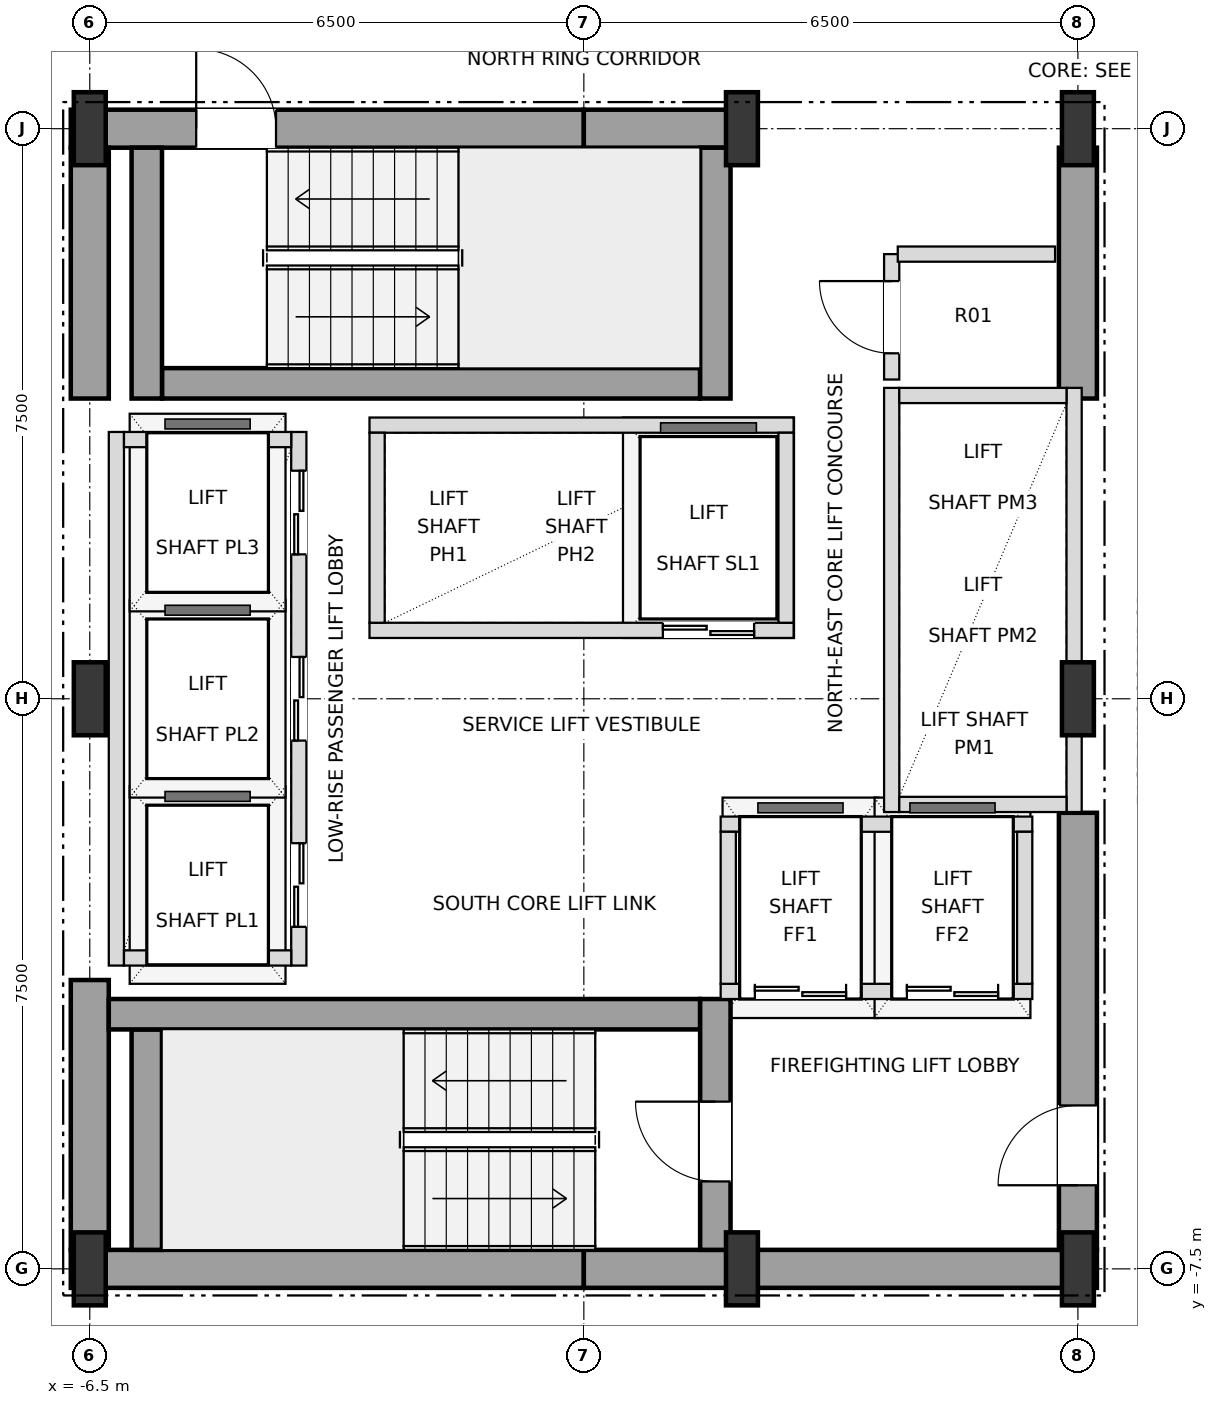
"""IFC4 building model, lengths in metres.
Left out: names, types, materials, properties, quantities, classifications, styles, units other than length and angle.
Written with IfcOpenShell. Run it as: python <this file> out.ifc"""

import sys

from ifc_helpers import new_model, si_unit, direction, frame, frame_2d, origin, origin_2d, place, context, subcontext, project, spatial, rectangle, i_section, extrude, element, fill, save


model = new_model("IFC4")
c1 = context("Model", 3, precision=1e-05, world=origin(), true_north=direction((0.0, 1.0)))
c2 = subcontext(c1, "Body", "Model", "MODEL_VIEW")
j1 = project(units=[si_unit("LENGTHUNIT", "METRE"), si_unit("PLANEANGLEUNIT", "RADIAN")], contexts=[c1])
p1 = place(None, origin())
s1 = spatial("IfcSite", under=j1, at=p1, CompositionType="ELEMENT")
p2 = place(p1, origin())
s2 = spatial("IfcBuilding", under=s1, at=p2, CompositionType="ELEMENT")
p3 = place(p2, frame((0.0, 0.0, 68.4)))
s3 = spatial("IfcBuildingStorey", under=s2, at=p3, CompositionType="ELEMENT", Elevation=68.4)
for number, where, z_axis, x_axis in (
    (1, (-6.5, -7.5, 0.0), (0.0, 0.0, 1.0), (1.0, 0.0, 0.0)),
    (2, (2.08, -7.5, 0.0), (0.0, 0.0, 1.0), (1.0, 0.0, 0.0)),
    (3, (6.5, -7.5, 0.0), (0.0, 0.0, 1.0), (1.0, 0.0, 0.0)),
    (4, (-6.5, 0.0, 0.0), (0.0, 0.0, 1.0), (1.0, 0.0, 0.0)),
    (5, (6.5, 0.0, 0.0), (0.0, 0.0, 1.0), (1.0, 0.0, 0.0)),
    (6, (-6.5, 7.5, 0.0), (0.0, 0.0, 1.0), (1.0, 0.0, 0.0)),
    (7, (2.08, 7.5, 0.0), (0.0, 0.0, 1.0), (1.0, 0.0, 0.0)),
    (8, (6.5, 7.5, 0.0), (0.0, 0.0, 1.0), (1.0, 0.0, 0.0)),
):
    element("IfcColumn", number, at=place(p3, frame(where, z_axis=z_axis, x_axis=x_axis)), inside=s3, PredefinedType="COLUMN", context=c2, shape_type="SweptSolid", body=[
        extrude(i_section(OverallWidth=0.42, OverallDepth=0.96, WebThickness=0.022, FlangeThickness=0.034, at=origin_2d()), origin(), (0.0, 0.0, 1.0), 3.6),
    ])
for number, where, z_axis, x_axis in (
    (9, (-6.75, -7.5, 0.0), (0.0, 0.0, 1.0), (1.0, 0.0, 0.0)),
    (10, (0.0, -7.5, 0.0), (0.0, 0.0, 1.0), (1.0, 0.0, 0.0)),
):
    element("IfcWall", number, at=place(p3, frame(where, z_axis=z_axis, x_axis=x_axis)), inside=s3, PredefinedType="SHEAR", context=c2, shape_type="SweptSolid", body=[
        extrude(rectangle(XDim=6.75, YDim=0.5, at=frame_2d((3.375, 0.0))), origin(), (0.0, 0.0, 1.0), 3.38),
    ])
p4 = place(p3, frame((-6.75, 7.5, 0.0), z_axis=(0.0, 0.0, 1.0), x_axis=(1.0, 0.0, 0.0)))
e11 = element("IfcWall", 11, at=p4, inside=s3, PredefinedType="SHEAR", context=c2, shape_type="SweptSolid", body=[
    extrude(rectangle(XDim=6.75, YDim=0.5, at=frame_2d((3.375, 0.0))), origin(), (0.0, 0.0, 1.0), 3.38),
])
p5 = place(p4, frame((1.65, 0.0, 0.0)))
e12 = element("IfcOpeningElement", 12, at=p5, cuts=e11, PredefinedType="OPENING", context=c2, shape_type="SweptSolid", body=[
    extrude(rectangle(XDim=1.05, YDim=2.15, at=frame_2d((0.525, 1.075))), frame((0.0, 0.26, 0.0), z_axis=(0.0, -1.0, 0.0), x_axis=(1.0, 0.0, 0.0)), (0.0, 0.0, 1.0), 0.52),
])
p6 = place(p3, frame((0.0, 7.5, 0.0), z_axis=(0.0, 0.0, 1.0), x_axis=(1.0, 0.0, 0.0)))
e13 = element("IfcWall", 13, at=p6, inside=s3, PredefinedType="SHEAR", context=c2, shape_type="SweptSolid", body=[
    extrude(rectangle(XDim=2.08, YDim=0.5, at=frame_2d((1.04, 0.0))), origin(), (0.0, 0.0, 1.0), 3.38),
])
p7 = place(p3, frame((-6.5, -7.25, 0.0), z_axis=(0.0, 0.0, 1.0), x_axis=(0.0, 1.0, 0.0)))
e14 = element("IfcWall", 14, at=p7, inside=s3, PredefinedType="SHEAR", context=c2, shape_type="SweptSolid", body=[
    extrude(rectangle(XDim=3.55, YDim=0.5, at=frame_2d((1.775, 0.0))), origin(), (0.0, 0.0, 1.0), 3.38),
])
p8 = place(p3, frame((-6.5, 3.95, 0.0), z_axis=(0.0, 0.0, 1.0), x_axis=(0.0, 1.0, 0.0)))
e15 = element("IfcWall", 15, at=p8, inside=s3, PredefinedType="SHEAR", context=c2, shape_type="SweptSolid", body=[
    extrude(rectangle(XDim=3.3, YDim=0.5, at=frame_2d((1.65, 0.0))), origin(), (0.0, 0.0, 1.0), 3.38),
])
p9 = place(p3, frame((6.5, -7.25, 0.0), z_axis=(0.0, 0.0, 1.0), x_axis=(0.0, 1.0, 0.0)))
e16 = element("IfcWall", 16, at=p9, inside=s3, PredefinedType="SHEAR", context=c2, shape_type="SweptSolid", body=[
    extrude(rectangle(XDim=5.75, YDim=0.5, at=frame_2d((2.875, 0.0))), origin(), (0.0, 0.0, 1.0), 3.38),
])
p10 = place(p9, frame((0.85, 0.0, 0.0)))
e17 = element("IfcOpeningElement", 17, at=p10, cuts=e16, PredefinedType="OPENING", context=c2, shape_type="SweptSolid", body=[
    extrude(rectangle(XDim=1.05, YDim=2.15, at=frame_2d((0.525, 1.075))), frame((0.0, 0.26, 0.0), z_axis=(0.0, -1.0, 0.0), x_axis=(1.0, 0.0, 0.0)), (0.0, 0.0, 1.0), 0.52),
])
p11 = place(p3, frame((6.5, 3.95, 0.0), z_axis=(0.0, 0.0, 1.0), x_axis=(0.0, 1.0, 0.0)))
e18 = element("IfcWall", 18, at=p11, inside=s3, PredefinedType="SHEAR", context=c2, shape_type="SweptSolid", body=[
    extrude(rectangle(XDim=3.3, YDim=0.5, at=frame_2d((1.65, 0.0))), origin(), (0.0, 0.0, 1.0), 3.38),
])
p12 = place(p3, frame((-5.75, -7.25, 0.0), z_axis=(0.0, 0.0, 1.0), x_axis=(0.0, 1.0, 0.0)))
e19 = element("IfcWall", 19, at=p12, inside=s3, PredefinedType="SHEAR", context=c2, shape_type="SweptSolid", body=[
    extrude(rectangle(XDim=2.9, YDim=0.4, at=frame_2d((1.45, 0.0))), origin(), (0.0, 0.0, 1.0), 3.38),
])
p13 = place(p3, frame((-6.25, -4.15, 0.0), z_axis=(0.0, 0.0, 1.0), x_axis=(1.0, 0.0, 0.0)))
e20 = element("IfcWall", 20, at=p13, inside=s3, PredefinedType="SHEAR", context=c2, shape_type="SweptSolid", body=[
    extrude(rectangle(XDim=7.78, YDim=0.4, at=frame_2d((3.89, 0.0))), origin(), (0.0, 0.0, 1.0), 3.38),
])
p14 = place(p3, frame((1.73, -7.25, 0.0), z_axis=(0.0, 0.0, 1.0), x_axis=(0.0, 1.0, 0.0)))
e21 = element("IfcWall", 21, at=p14, inside=s3, PredefinedType="SHEAR", context=c2, shape_type="SweptSolid", body=[
    extrude(rectangle(XDim=3.3, YDim=0.4, at=frame_2d((1.65, 0.0))), origin(), (0.0, 0.0, 1.0), 3.38),
])
p15 = place(p14, frame((0.9, 0.0, 0.0)))
e22 = element("IfcOpeningElement", 22, at=p15, cuts=e21, PredefinedType="OPENING", context=c2, shape_type="SweptSolid", body=[
    extrude(rectangle(XDim=1.05, YDim=2.15, at=frame_2d((0.525, 1.075))), frame((0.0, 0.21, 0.0), z_axis=(0.0, -1.0, 0.0), x_axis=(1.0, 0.0, 0.0)), (0.0, 0.0, 1.0), 0.42),
])
p16 = place(p3, frame((-5.55, 4.15, 0.0), z_axis=(0.0, 0.0, 1.0), x_axis=(1.0, 0.0, 0.0)))
e23 = element("IfcWall", 23, at=p16, inside=s3, PredefinedType="SHEAR", context=c2, shape_type="SweptSolid", body=[
    extrude(rectangle(XDim=7.08, YDim=0.4, at=frame_2d((3.54, 0.0))), origin(), (0.0, 0.0, 1.0), 3.38),
])
for number, where, z_axis, x_axis in (
    (24, (1.73, 3.95, 0.0), (0.0, 0.0, 1.0), (0.0, 1.0, 0.0)),
    (25, (-5.75, 3.95, 0.0), (0.0, 0.0, 1.0), (0.0, 1.0, 0.0)),
):
    element("IfcWall", number, at=place(p3, frame(where, z_axis=z_axis, x_axis=x_axis)), inside=s3, PredefinedType="SHEAR", context=c2, shape_type="SweptSolid", body=[
        extrude(rectangle(XDim=3.3, YDim=0.4, at=frame_2d((1.65, 0.0))), origin(), (0.0, 0.0, 1.0), 3.38),
    ])
p17 = place(p3, frame((-3.75, -3.51, 0.0), z_axis=(0.0, 0.0, 1.0), x_axis=(0.0, 1.0, 0.0)))
e26 = element("IfcWall", 26, at=p17, inside=s3, PredefinedType="SOLIDWALL", context=c2, shape_type="SweptSolid", body=[
    extrude(rectangle(XDim=7.02, YDim=0.2, at=frame_2d((3.51, 0.0))), origin(), (0.0, 0.0, 1.0), 3.38),
])
p18 = place(p17, frame((0.51, 0.0, 0.0)))
e27 = element("IfcOpeningElement", 27, at=p18, cuts=e26, PredefinedType="OPENING", context=c2, shape_type="SweptSolid", body=[
    extrude(rectangle(XDim=1.1, YDim=2.15, at=frame_2d((0.55, 1.075))), frame((0.0, 0.11, 0.0), z_axis=(0.0, -1.0, 0.0), x_axis=(1.0, 0.0, 0.0)), (0.0, 0.0, 1.0), 0.22),
])
p19 = place(p17, frame((2.96, 0.0, 0.0)))
e28 = element("IfcOpeningElement", 28, at=p19, cuts=e26, PredefinedType="OPENING", context=c2, shape_type="SweptSolid", body=[
    extrude(rectangle(XDim=1.1, YDim=2.15, at=frame_2d((0.55, 1.075))), frame((0.0, 0.11, 0.0), z_axis=(0.0, -1.0, 0.0), x_axis=(1.0, 0.0, 0.0)), (0.0, 0.0, 1.0), 0.22),
])
p20 = place(p17, frame((5.41, 0.0, 0.0)))
e29 = element("IfcOpeningElement", 29, at=p20, cuts=e26, PredefinedType="OPENING", context=c2, shape_type="SweptSolid", body=[
    extrude(rectangle(XDim=1.1, YDim=2.15, at=frame_2d((0.55, 1.075))), frame((0.0, 0.11, 0.0), z_axis=(0.0, -1.0, 0.0), x_axis=(1.0, 0.0, 0.0)), (0.0, 0.0, 1.0), 0.22),
])
p21 = place(p3, frame((-6.15, -3.51, 0.0), z_axis=(0.0, 0.0, 1.0), x_axis=(0.0, 1.0, 0.0)))
e30 = element("IfcWall", 30, at=p21, inside=s3, PredefinedType="SOLIDWALL", context=c2, shape_type="SweptSolid", body=[
    extrude(rectangle(XDim=7.02, YDim=0.2, at=frame_2d((3.51, 0.0))), origin(), (0.0, 0.0, 1.0), 3.38),
])
for number, where, z_axis, x_axis in (
    (31, (-6.05, -3.41, 0.0), (0.0, 0.0, 1.0), (1.0, 0.0, 0.0)),
    (32, (-6.05, 3.41, 0.0), (0.0, 0.0, 1.0), (1.0, 0.0, 0.0)),
):
    element("IfcWall", number, at=place(p3, frame(where, z_axis=z_axis, x_axis=x_axis)), inside=s3, PredefinedType="SOLIDWALL", context=c2, shape_type="SweptSolid", body=[
        extrude(rectangle(XDim=2.2, YDim=0.2, at=frame_2d((1.1, 0.0))), origin(), (0.0, 0.0, 1.0), 3.38),
    ])
p22 = place(p3, frame((4.05, -1.49, 0.0), z_axis=(0.0, 0.0, 1.0), x_axis=(0.0, 1.0, 0.0)))
e33 = element("IfcWall", 33, at=p22, inside=s3, PredefinedType="SOLIDWALL", context=c2, shape_type="SweptSolid", body=[
    extrude(rectangle(XDim=5.58, YDim=0.2, at=frame_2d((2.79, 0.0))), origin(), (0.0, 0.0, 1.0), 3.38),
])
p23 = place(p3, frame((6.45, -1.49, 0.0), z_axis=(0.0, 0.0, 1.0), x_axis=(0.0, 1.0, 0.0)))
e34 = element("IfcWall", 34, at=p23, inside=s3, PredefinedType="SOLIDWALL", context=c2, shape_type="SweptSolid", body=[
    extrude(rectangle(XDim=5.58, YDim=0.2, at=frame_2d((2.79, 0.0))), origin(), (0.0, 0.0, 1.0), 2.816),
])
for number, where, z_axis, x_axis in (
    (35, (4.15, -1.39, 0.0), (0.0, 0.0, 1.0), (1.0, 0.0, 0.0)),
    (36, (4.15, 3.99, 0.0), (0.0, 0.0, 1.0), (1.0, 0.0, 0.0)),
):
    element("IfcWall", number, at=place(p3, frame(where, z_axis=z_axis, x_axis=x_axis)), inside=s3, PredefinedType="SOLIDWALL", context=c2, shape_type="SweptSolid", body=[
        extrude(rectangle(XDim=2.2, YDim=0.2, at=frame_2d((1.1, 0.0))), origin(), (0.0, 0.0, 1.0), 3.38),
    ])
p24 = place(p3, frame((-2.82, 0.9, 0.0), z_axis=(0.0, 0.0, 1.0), x_axis=(1.0, 0.0, 0.0)))
e37 = element("IfcWall", 37, at=p24, inside=s3, PredefinedType="SOLIDWALL", context=c2, shape_type="SweptSolid", body=[
    extrude(rectangle(XDim=5.58, YDim=0.2, at=frame_2d((2.79, 0.0))), origin(), (0.0, 0.0, 1.0), 3.38),
])
p25 = place(p24, frame((3.86, 0.0, 0.0)))
e38 = element("IfcOpeningElement", 38, at=p25, cuts=e37, PredefinedType="OPENING", context=c2, shape_type="SweptSolid", body=[
    extrude(rectangle(XDim=1.2, YDim=2.2, at=frame_2d((0.6, 1.1))), frame((0.0, 0.11, 0.0), z_axis=(0.0, -1.0, 0.0), x_axis=(1.0, 0.0, 0.0)), (0.0, 0.0, 1.0), 0.22),
])
p26 = place(p3, frame((-2.82, 3.6, 0.0), z_axis=(0.0, 0.0, 1.0), x_axis=(1.0, 0.0, 0.0)))
e39 = element("IfcWall", 39, at=p26, inside=s3, PredefinedType="SOLIDWALL", context=c2, shape_type="SweptSolid", body=[
    extrude(rectangle(XDim=5.58, YDim=0.2, at=frame_2d((2.79, 0.0))), origin(), (0.0, 0.0, 1.0), 3.38),
])
for number, where, z_axis, x_axis in (
    (40, (-2.72, 1.0, 0.0), (0.0, 0.0, 1.0), (0.0, 1.0, 0.0)),
    (41, (2.66, 1.0, 0.0), (0.0, 0.0, 1.0), (0.0, 1.0, 0.0)),
):
    element("IfcWall", number, at=place(p3, frame(where, z_axis=z_axis, x_axis=x_axis)), inside=s3, PredefinedType="SOLIDWALL", context=c2, shape_type="SweptSolid", body=[
        extrude(rectangle(XDim=2.5, YDim=0.2, at=frame_2d((1.25, 0.0))), origin(), (0.0, 0.0, 1.0), 3.38),
    ])
p27 = place(p3, frame((1.8, -3.85, 0.0), z_axis=(0.0, 0.0, 1.0), x_axis=(1.0, 0.0, 0.0)))
e42 = element("IfcWall", 42, at=p27, inside=s3, PredefinedType="SOLIDWALL", context=c2, shape_type="SweptSolid", body=[
    extrude(rectangle(XDim=4.1, YDim=0.2, at=frame_2d((2.05, 0.0))), origin(), (0.0, 0.0, 1.0), 3.38),
])
p28 = place(p27, frame((0.45, 0.0, 0.0)))
e43 = element("IfcOpeningElement", 43, at=p28, cuts=e42, PredefinedType="OPENING", context=c2, shape_type="SweptSolid", body=[
    extrude(rectangle(XDim=1.2, YDim=2.2, at=frame_2d((0.6, 1.1))), frame((0.0, 0.11, 0.0), z_axis=(0.0, -1.0, 0.0), x_axis=(1.0, 0.0, 0.0)), (0.0, 0.0, 1.0), 0.22),
])
p29 = place(p27, frame((2.45, 0.0, 0.0)))
e44 = element("IfcOpeningElement", 44, at=p29, cuts=e42, PredefinedType="OPENING", context=c2, shape_type="SweptSolid", body=[
    extrude(rectangle(XDim=1.2, YDim=2.2, at=frame_2d((0.6, 1.1))), frame((0.0, 0.11, 0.0), z_axis=(0.0, -1.0, 0.0), x_axis=(1.0, 0.0, 0.0)), (0.0, 0.0, 1.0), 0.22),
])
p30 = place(p3, frame((1.8, -1.65, 0.0), z_axis=(0.0, 0.0, 1.0), x_axis=(1.0, 0.0, 0.0)))
e45 = element("IfcWall", 45, at=p30, inside=s3, PredefinedType="SOLIDWALL", context=c2, shape_type="SweptSolid", body=[
    extrude(rectangle(XDim=4.1, YDim=0.2, at=frame_2d((2.05, 0.0))), origin(), (0.0, 0.0, 1.0), 3.38),
])
for number, where, z_axis, x_axis in (
    (46, (1.9, -3.75, 0.0), (0.0, 0.0, 1.0), (0.0, 1.0, 0.0)),
    (47, (5.8, -3.75, 0.0), (0.0, 0.0, 1.0), (0.0, 1.0, 0.0)),
):
    element("IfcWall", number, at=place(p3, frame(where, z_axis=z_axis, x_axis=x_axis)), inside=s3, PredefinedType="SOLIDWALL", context=c2, shape_type="SweptSolid", body=[
        extrude(rectangle(XDim=2.0, YDim=0.2, at=frame_2d((1.0, 0.0))), origin(), (0.0, 0.0, 1.0), 3.38),
    ])
p31 = place(p3, frame((4.05, 4.2, 0.0), z_axis=(0.0, 0.0, 1.0), x_axis=(0.0, 1.0, 0.0)))
e48 = element("IfcWall", 48, at=p31, inside=s3, PredefinedType="SOLIDWALL", context=c2, shape_type="SweptSolid", body=[
    extrude(rectangle(XDim=1.65, YDim=0.2, at=frame_2d((0.825, 0.0))), origin(), (0.0, 0.0, 1.0), 3.38),
])
p32 = place(p31, frame((0.345, 0.0, 0.0)))
e49 = element("IfcOpeningElement", 49, at=p32, cuts=e48, PredefinedType="OPENING", context=c2, shape_type="SweptSolid", body=[
    extrude(rectangle(XDim=0.95, YDim=2.15, at=frame_2d((0.475, 1.075))), frame((0.0, 0.11, 0.0), z_axis=(0.0, -1.0, 0.0), x_axis=(1.0, 0.0, 0.0)), (0.0, 0.0, 1.0), 0.22),
])
p33 = place(p3, frame((4.13, 5.85, 0.0), z_axis=(0.0, 0.0, 1.0), x_axis=(1.0, 0.0, 0.0)))
e50 = element("IfcWall", 50, at=p33, inside=s3, PredefinedType="SOLIDWALL", context=c2, shape_type="SweptSolid", body=[
    extrude(rectangle(XDim=2.07, YDim=0.2, at=frame_2d((1.035, 0.0))), origin(), (0.0, 0.0, 1.0), 3.38),
])
p34 = place(p10, origin())
e51 = element("IfcDoor", 51, at=p34, inside=s3, OperationType="SINGLE_SWING_LEFT", PredefinedType="DOOR", context=c2, shape_type="SweptSolid", body=[
    extrude(rectangle(XDim=1.05, YDim=2.15, at=frame_2d((0.525, 1.075))), frame((0.0, 0.025, 0.0), z_axis=(0.0, -1.0, 0.0), x_axis=(1.0, 0.0, 0.0)), (0.0, 0.0, 1.0), 0.05),
])
fill(e17, e51)
p35 = place(p15, origin())
e52 = element("IfcDoor", 52, at=p35, inside=s3, OperationType="SINGLE_SWING_RIGHT", PredefinedType="DOOR", context=c2, shape_type="SweptSolid", body=[
    extrude(rectangle(XDim=1.05, YDim=2.15, at=frame_2d((0.525, 1.075))), frame((0.0, 0.025, 0.0), z_axis=(0.0, -1.0, 0.0), x_axis=(1.0, 0.0, 0.0)), (0.0, 0.0, 1.0), 0.05),
])
fill(e22, e52)
p36 = place(p5, origin())
e53 = element("IfcDoor", 53, at=p36, inside=s3, OperationType="SINGLE_SWING_LEFT", PredefinedType="DOOR", context=c2, shape_type="SweptSolid", body=[
    extrude(rectangle(XDim=1.05, YDim=2.15, at=frame_2d((0.525, 1.075))), frame((0.0, 0.025, 0.0), z_axis=(0.0, -1.0, 0.0), x_axis=(1.0, 0.0, 0.0)), (0.0, 0.0, 1.0), 0.05),
])
fill(e12, e53)
p37 = place(p18, origin())
e54 = element("IfcDoor", 54, at=p37, inside=s3, OperationType="DOUBLE_DOOR_SLIDING", PredefinedType="DOOR", context=c2, shape_type="SweptSolid", body=[
    extrude(rectangle(XDim=1.1, YDim=2.15, at=frame_2d((0.55, 1.075))), frame((0.0, 0.025, 0.0), z_axis=(0.0, -1.0, 0.0), x_axis=(1.0, 0.0, 0.0)), (0.0, 0.0, 1.0), 0.05),
])
fill(e27, e54)
p38 = place(p19, origin())
e55 = element("IfcDoor", 55, at=p38, inside=s3, OperationType="DOUBLE_DOOR_SLIDING", PredefinedType="DOOR", context=c2, shape_type="SweptSolid", body=[
    extrude(rectangle(XDim=1.1, YDim=2.15, at=frame_2d((0.55, 1.075))), frame((0.0, 0.025, 0.0), z_axis=(0.0, -1.0, 0.0), x_axis=(1.0, 0.0, 0.0)), (0.0, 0.0, 1.0), 0.05),
])
fill(e28, e55)
p39 = place(p20, origin())
e56 = element("IfcDoor", 56, at=p39, inside=s3, OperationType="DOUBLE_DOOR_SLIDING", PredefinedType="DOOR", context=c2, shape_type="SweptSolid", body=[
    extrude(rectangle(XDim=1.1, YDim=2.15, at=frame_2d((0.55, 1.075))), frame((0.0, 0.025, 0.0), z_axis=(0.0, -1.0, 0.0), x_axis=(1.0, 0.0, 0.0)), (0.0, 0.0, 1.0), 0.05),
])
fill(e29, e56)
p40 = place(p25, origin())
e57 = element("IfcDoor", 57, at=p40, inside=s3, OperationType="DOUBLE_DOOR_SLIDING", PredefinedType="DOOR", context=c2, shape_type="SweptSolid", body=[
    extrude(rectangle(XDim=1.2, YDim=2.2, at=frame_2d((0.6, 1.1))), frame((0.0, 0.025, 0.0), z_axis=(0.0, -1.0, 0.0), x_axis=(1.0, 0.0, 0.0)), (0.0, 0.0, 1.0), 0.05),
])
fill(e38, e57)
p41 = place(p28, origin())
e58 = element("IfcDoor", 58, at=p41, inside=s3, OperationType="DOUBLE_DOOR_SLIDING", PredefinedType="DOOR", context=c2, shape_type="SweptSolid", body=[
    extrude(rectangle(XDim=1.2, YDim=2.2, at=frame_2d((0.6, 1.1))), frame((0.0, 0.025, 0.0), z_axis=(0.0, -1.0, 0.0), x_axis=(1.0, 0.0, 0.0)), (0.0, 0.0, 1.0), 0.05),
])
fill(e43, e58)
p42 = place(p29, origin())
e59 = element("IfcDoor", 59, at=p42, inside=s3, OperationType="DOUBLE_DOOR_SLIDING", PredefinedType="DOOR", context=c2, shape_type="SweptSolid", body=[
    extrude(rectangle(XDim=1.2, YDim=2.2, at=frame_2d((0.6, 1.1))), frame((0.0, 0.025, 0.0), z_axis=(0.0, -1.0, 0.0), x_axis=(1.0, 0.0, 0.0)), (0.0, 0.0, 1.0), 0.05),
])
fill(e44, e59)
p43 = place(p32, origin())
e60 = element("IfcDoor", 60, at=p43, inside=s3, OperationType="SINGLE_SWING_RIGHT", PredefinedType="DOOR", context=c2, shape_type="SweptSolid", body=[
    extrude(rectangle(XDim=0.95, YDim=2.15, at=frame_2d((0.475, 1.075))), frame((0.0, 0.025, 0.0), z_axis=(0.0, -1.0, 0.0), x_axis=(1.0, 0.0, 0.0)), (0.0, 0.0, 1.0), 0.05),
])
fill(e49, e60)
save(model, sys.argv[1])
